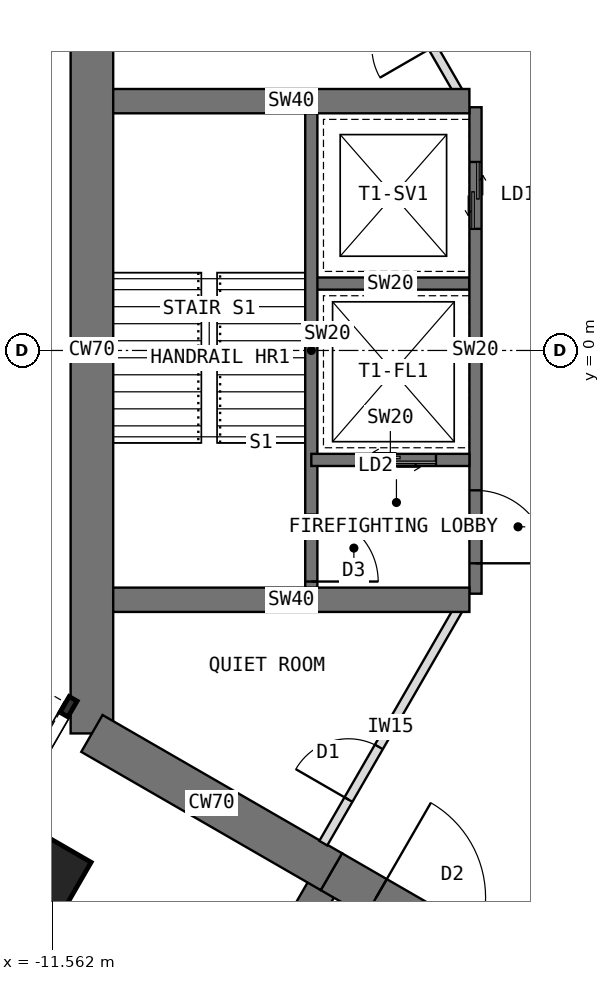
"""IFC4 building model, lengths in metres.
Left out: names, types, materials, properties, quantities, classifications, styles, units other than length and angle.
Written with IfcOpenShell. Run it as: python <this file> out.ifc"""

import sys

from ifc_helpers import new_model, si_unit, direction, frame, frame_2d, origin, origin_2d, place, context, subcontext, project, spatial, rectangle, extrude, element, fill, save


model = new_model("IFC4")
c1 = context("Model", 3, precision=1e-05, world=origin(), true_north=direction((0.0, 1.0)))
c2 = subcontext(c1, "Body", "Model", "MODEL_VIEW")
j1 = project(units=[si_unit("LENGTHUNIT", "METRE"), si_unit("PLANEANGLEUNIT", "RADIAN")], contexts=[c1])
p1 = place(None, origin())
s1 = spatial("IfcSite", under=j1, at=p1, CompositionType="ELEMENT")
p2 = place(p1, origin())
s2 = spatial("IfcBuilding", under=s1, at=p2, CompositionType="ELEMENT")
p3 = place(p2, frame((0.0, 0.0, 36.5)))
s3 = spatial("IfcBuildingStorey", under=s2, at=p3, CompositionType="ELEMENT", Elevation=36.5)
p4 = place(p3, frame((-10.908, 6.298, 0.0), z_axis=(0.0, 0.0, 1.0), x_axis=(0.0, -1.0, 0.0)))
e1 = element("IfcWall", 1, at=p4, inside=s3, PredefinedType="SHEAR", context=c2, shape_type="SweptSolid", body=[
    extrude(rectangle(XDim=12.596, YDim=0.7, at=frame_2d((6.298, 0.0))), origin(), (0.0, 0.0, 1.0), 4.0),
])
p5 = place(p3, frame((-10.908, -6.298, 0.0), z_axis=(0.0, 0.0, 1.0), x_axis=(0.866034513004, -0.499984222037, 0.0)))
e2 = element("IfcWall", 2, at=p5, inside=s3, PredefinedType="SHEAR", context=c2, shape_type="SweptSolid", body=[
    extrude(rectangle(XDim=4.548, YDim=0.7, at=frame_2d((2.274, 0.0))), origin(), (0.0, 0.0, 1.0), 4.0),
])
p6 = place(p3, frame((-6.97, -8.572, 0.0), z_axis=(0.0, 0.0, 1.0), x_axis=(0.866019471182, -0.500010275428, 0.0)))
e3 = element("IfcWall", 3, at=p6, inside=s3, PredefinedType="SHEAR", context=c2, shape_type="SweptSolid", body=[
    extrude(rectangle(XDim=3.5, YDim=0.7, at=frame_2d((1.75, 0.0))), origin(), (0.0, 0.0, 1.0), 4.0),
])
p7 = place(p6, frame((0.85, 0.0, 0.0)))
e4 = element("IfcOpeningElement", 4, at=p7, cuts=e3, PredefinedType="OPENING", context=c2, shape_type="SweptSolid", body=[
    extrude(rectangle(XDim=1.8, YDim=2.1, at=frame_2d((0.9, 1.05))), frame((0.0, 0.36, 0.0), z_axis=(0.0, -1.0, 0.0), x_axis=(1.0, 0.0, 0.0)), (0.0, 0.0, 1.0), 0.72),
])
p8 = place(p3, frame((-6.97, -8.572, 0.0), z_axis=(0.0, 0.0, 1.0), x_axis=(-0.499988811324, -0.866031863473, 0.0)))
e5 = element("IfcWall", 5, at=p8, inside=s3, PredefinedType="SHEAR", context=c2, shape_type="SweptSolid", body=[
    extrude(rectangle(XDim=2.592, YDim=0.5, at=frame_2d((1.296, 0.0))), origin(), (0.0, 0.0, 1.0), 4.0),
])
p9 = place(p3, frame((-11.946, -8.691, 0.0), z_axis=(0.0, 0.0, 1.0), x_axis=(0.5, 0.866025403784, 0.0)))
e6 = element("IfcColumn", 6, at=p9, inside=s3, PredefinedType="COLUMN", context=c2, shape_type="SweptSolid", body=[
    extrude(rectangle(XDim=1.5, YDim=1.5, at=origin_2d()), origin(), (0.0, 0.0, 1.0), 4.0),
])
p10 = place(p3, frame((-4.6, 4.0, 0.0), z_axis=(0.0, 0.0, 1.0), x_axis=(0.0, -1.0, 0.0)))
e7 = element("IfcWall", 7, at=p10, inside=s3, PredefinedType="SHEAR", context=c2, shape_type="SweptSolid", body=[
    extrude(rectangle(XDim=8.0, YDim=0.2, at=frame_2d((4.0, 0.0))), origin(), (0.0, 0.0, 1.0), 4.0),
])
p11 = place(p10, frame((6.3, 0.0, 0.0)))
e8 = element("IfcOpeningElement", 8, at=p11, cuts=e7, PredefinedType="OPENING", context=c2, shape_type="SweptSolid", body=[
    extrude(rectangle(XDim=1.2, YDim=2.1, at=frame_2d((0.6, 1.05))), frame((0.0, 0.11, 0.0), z_axis=(0.0, -1.0, 0.0), x_axis=(1.0, 0.0, 0.0)), (0.0, 0.0, 1.0), 0.22),
])
p12 = place(p10, frame((0.9, 0.0, 0.0)))
e9 = element("IfcOpeningElement", 9, at=p12, cuts=e7, PredefinedType="OPENING", context=c2, shape_type="SweptSolid", body=[
    extrude(rectangle(XDim=1.1, YDim=2.2, at=frame_2d((0.55, 1.1))), frame((0.0, 0.11, 0.0), z_axis=(0.0, -1.0, 0.0), x_axis=(1.0, 0.0, 0.0)), (0.0, 0.0, 1.0), 0.22),
])
p13 = place(p3, frame((-4.7, 1.1, 0.0), z_axis=(0.0, 0.0, 1.0), x_axis=(-1.0, 0.0, 0.0)))
e10 = element("IfcWall", 10, at=p13, inside=s3, PredefinedType="SHEAR", context=c2, shape_type="SweptSolid", body=[
    extrude(rectangle(XDim=2.6, YDim=0.2, at=frame_2d((1.3, 0.0))), origin(), (0.0, 0.0, 1.0), 4.0),
])
p14 = place(p3, frame((-4.7, -1.8, 0.0), z_axis=(0.0, 0.0, 1.0), x_axis=(-1.0, 0.0, 0.0)))
e11 = element("IfcWall", 11, at=p14, inside=s3, PredefinedType="SHEAR", context=c2, shape_type="SweptSolid", body=[
    extrude(rectangle(XDim=2.6, YDim=0.2, at=frame_2d((1.3, 0.0))), origin(), (0.0, 0.0, 1.0), 4.0),
])
p15 = place(p14, frame((0.55, 0.0, 0.0)))
e12 = element("IfcOpeningElement", 12, at=p15, cuts=e11, PredefinedType="OPENING", context=c2, shape_type="SweptSolid", body=[
    extrude(rectangle(XDim=1.3, YDim=2.2, at=frame_2d((0.65, 1.1))), frame((0.0, 0.11, 0.0), z_axis=(0.0, -1.0, 0.0), x_axis=(1.0, 0.0, 0.0)), (0.0, 0.0, 1.0), 0.22),
])
p16 = place(p3, frame((-7.3, 4.0, 0.0), z_axis=(0.0, 0.0, 1.0), x_axis=(0.0, -1.0, 0.0)))
e13 = element("IfcWall", 13, at=p16, inside=s3, PredefinedType="SHEAR", context=c2, shape_type="SweptSolid", body=[
    extrude(rectangle(XDim=8.0, YDim=0.2, at=frame_2d((4.0, 0.0))), origin(), (0.0, 0.0, 1.0), 4.0),
])
p17 = place(p16, frame((6.7, 0.0, 0.0)))
e14 = element("IfcOpeningElement", 14, at=p17, cuts=e13, PredefinedType="OPENING", context=c2, shape_type="SweptSolid", body=[
    extrude(rectangle(XDim=1.1, YDim=2.1, at=frame_2d((0.55, 1.05))), frame((0.0, 0.11, 0.0), z_axis=(0.0, -1.0, 0.0), x_axis=(1.0, 0.0, 0.0)), (0.0, 0.0, 1.0), 0.22),
])
for number, where, z_axis, x_axis in (
    (15, (-4.7, -4.1, 0.0), (0.0, 0.0, 1.0), (-1.0, 0.0, 0.0)),
    (16, (-4.7, 4.1, 0.0), (0.0, 0.0, 1.0), (-1.0, 0.0, 0.0)),
):
    element("IfcWall", number, at=place(p3, frame(where, z_axis=z_axis, x_axis=x_axis)), inside=s3, PredefinedType="SHEAR", context=c2, shape_type="SweptSolid", body=[
        extrude(rectangle(XDim=5.858, YDim=0.4, at=frame_2d((2.929, 0.0))), origin(), (0.0, 0.0, 1.0), 4.0),
    ])
p18 = place(p3, frame((-7.103, -8.103, 0.0), z_axis=(0.0, 0.0, 1.0), x_axis=(0.500007369519, 0.866021148949, 0.0)))
e17 = element("IfcWall", 17, at=p18, inside=s3, PredefinedType="PARTITIONING", context=c2, shape_type="SweptSolid", body=[
    extrude(rectangle(XDim=4.426, YDim=0.15, at=frame_2d((2.213, 0.0))), origin(), (0.0, 0.0, 1.0), 3.8),
])
p19 = place(p18, frame((0.828, 0.0, 0.0)))
e18 = element("IfcOpeningElement", 18, at=p19, cuts=e17, PredefinedType="OPENING", context=c2, shape_type="SweptSolid", body=[
    extrude(rectangle(XDim=1.0, YDim=2.1, at=frame_2d((0.5, 1.05))), frame((0.0, 0.085, 0.0), z_axis=(0.0, -1.0, 0.0), x_axis=(1.0, 0.0, 0.0)), (0.0, 0.0, 1.0), 0.17),
])
p20 = place(p3, frame((-4.89, 4.27, 0.0), z_axis=(0.0, 0.0, 1.0), x_axis=(-0.500007369519, 0.866021148949, 0.0)))
e19 = element("IfcWall", 19, at=p20, inside=s3, PredefinedType="PARTITIONING", context=c2, shape_type="SweptSolid", body=[
    extrude(rectangle(XDim=4.426, YDim=0.15, at=frame_2d((2.213, 0.0))), origin(), (0.0, 0.0, 1.0), 3.8),
])
p21 = place(p20, frame((0.828, 0.0, 0.0)))
e20 = element("IfcOpeningElement", 20, at=p21, cuts=e19, PredefinedType="OPENING", context=c2, shape_type="SweptSolid", body=[
    extrude(rectangle(XDim=1.0, YDim=2.1, at=frame_2d((0.5, 1.05))), frame((0.0, 0.085, 0.0), z_axis=(0.0, -1.0, 0.0), x_axis=(1.0, 0.0, 0.0)), (0.0, 0.0, 1.0), 0.17),
])
p22 = place(p11, origin())
e21 = element("IfcDoor", 21, at=p22, inside=s3, OperationType="SINGLE_SWING_RIGHT", PredefinedType="DOOR", context=c2, shape_type="SweptSolid", body=[
    extrude(rectangle(XDim=1.2, YDim=2.1, at=frame_2d((0.6, 1.05))), frame((0.0, 0.025, 0.0), z_axis=(0.0, -1.0, 0.0), x_axis=(1.0, 0.0, 0.0)), (0.0, 0.0, 1.0), 0.05),
])
fill(e8, e21)
p23 = place(p15, origin())
e22 = element("IfcDoor", 22, at=p23, inside=s3, OperationType="DOUBLE_DOOR_SLIDING", PredefinedType="DOOR", context=c2, shape_type="SweptSolid", body=[
    extrude(rectangle(XDim=1.3, YDim=2.2, at=frame_2d((0.65, 1.1))), frame((0.0, 0.025, 0.0), z_axis=(0.0, -1.0, 0.0), x_axis=(1.0, 0.0, 0.0)), (0.0, 0.0, 1.0), 0.05),
])
fill(e12, e22)
p24 = place(p12, origin())
e23 = element("IfcDoor", 23, at=p24, inside=s3, OperationType="DOUBLE_DOOR_SLIDING", PredefinedType="DOOR", context=c2, shape_type="SweptSolid", body=[
    extrude(rectangle(XDim=1.1, YDim=2.2, at=frame_2d((0.55, 1.1))), frame((0.0, 0.025, 0.0), z_axis=(0.0, -1.0, 0.0), x_axis=(1.0, 0.0, 0.0)), (0.0, 0.0, 1.0), 0.05),
])
fill(e9, e23)
p25 = place(p17, origin())
e24 = element("IfcDoor", 24, at=p25, inside=s3, OperationType="SINGLE_SWING_RIGHT", PredefinedType="DOOR", context=c2, shape_type="SweptSolid", body=[
    extrude(rectangle(XDim=1.1, YDim=2.1, at=frame_2d((0.55, 1.05))), frame((0.0, 0.025, 0.0), z_axis=(0.0, -1.0, 0.0), x_axis=(1.0, 0.0, 0.0)), (0.0, 0.0, 1.0), 0.05),
])
fill(e14, e24)
p26 = place(p7, origin())
e25 = element("IfcDoor", 25, at=p26, inside=s3, OperationType="DOUBLE_DOOR_DOUBLE_SWING", PredefinedType="DOOR", context=c2, shape_type="SweptSolid", body=[
    extrude(rectangle(XDim=1.72, YDim=2.06, at=frame_2d((0.9, 1.03))), frame((0.0, 0.025, 0.0), z_axis=(0.0, -1.0, 0.0), x_axis=(1.0, 0.0, 0.0)), (0.0, 0.0, 1.0), 0.05),
    extrude(rectangle(XDim=0.04, YDim=2.1, at=frame_2d((0.02, 1.05))), frame((0.0, 0.35, 0.0), z_axis=(0.0, -1.0, 0.0), x_axis=(1.0, 0.0, 0.0)), (0.0, 0.0, 1.0), 0.699),
    extrude(rectangle(XDim=0.04, YDim=2.1, at=frame_2d((1.78, 1.05))), frame((0.0, 0.35, 0.0), z_axis=(0.0, -1.0, 0.0), x_axis=(1.0, 0.0, 0.0)), (0.0, 0.0, 1.0), 0.699),
    extrude(rectangle(XDim=1.72, YDim=0.04, at=frame_2d((0.9, 2.08))), frame((0.0, 0.35, 0.0), z_axis=(0.0, -1.0, 0.0), x_axis=(1.0, 0.0, 0.0)), (0.0, 0.0, 1.0), 0.699),
])
fill(e4, e25)
p27 = place(p19, origin())
e26 = element("IfcDoor", 26, at=p27, inside=s3, OperationType="SINGLE_SWING_LEFT", PredefinedType="DOOR", context=c2, shape_type="SweptSolid", body=[
    extrude(rectangle(XDim=1.0, YDim=2.1, at=frame_2d((0.5, 1.05))), frame((0.0, 0.025, 0.0), z_axis=(0.0, -1.0, 0.0), x_axis=(1.0, 0.0, 0.0)), (0.0, 0.0, 1.0), 0.05),
])
fill(e18, e26)
save(model, sys.argv[1])
